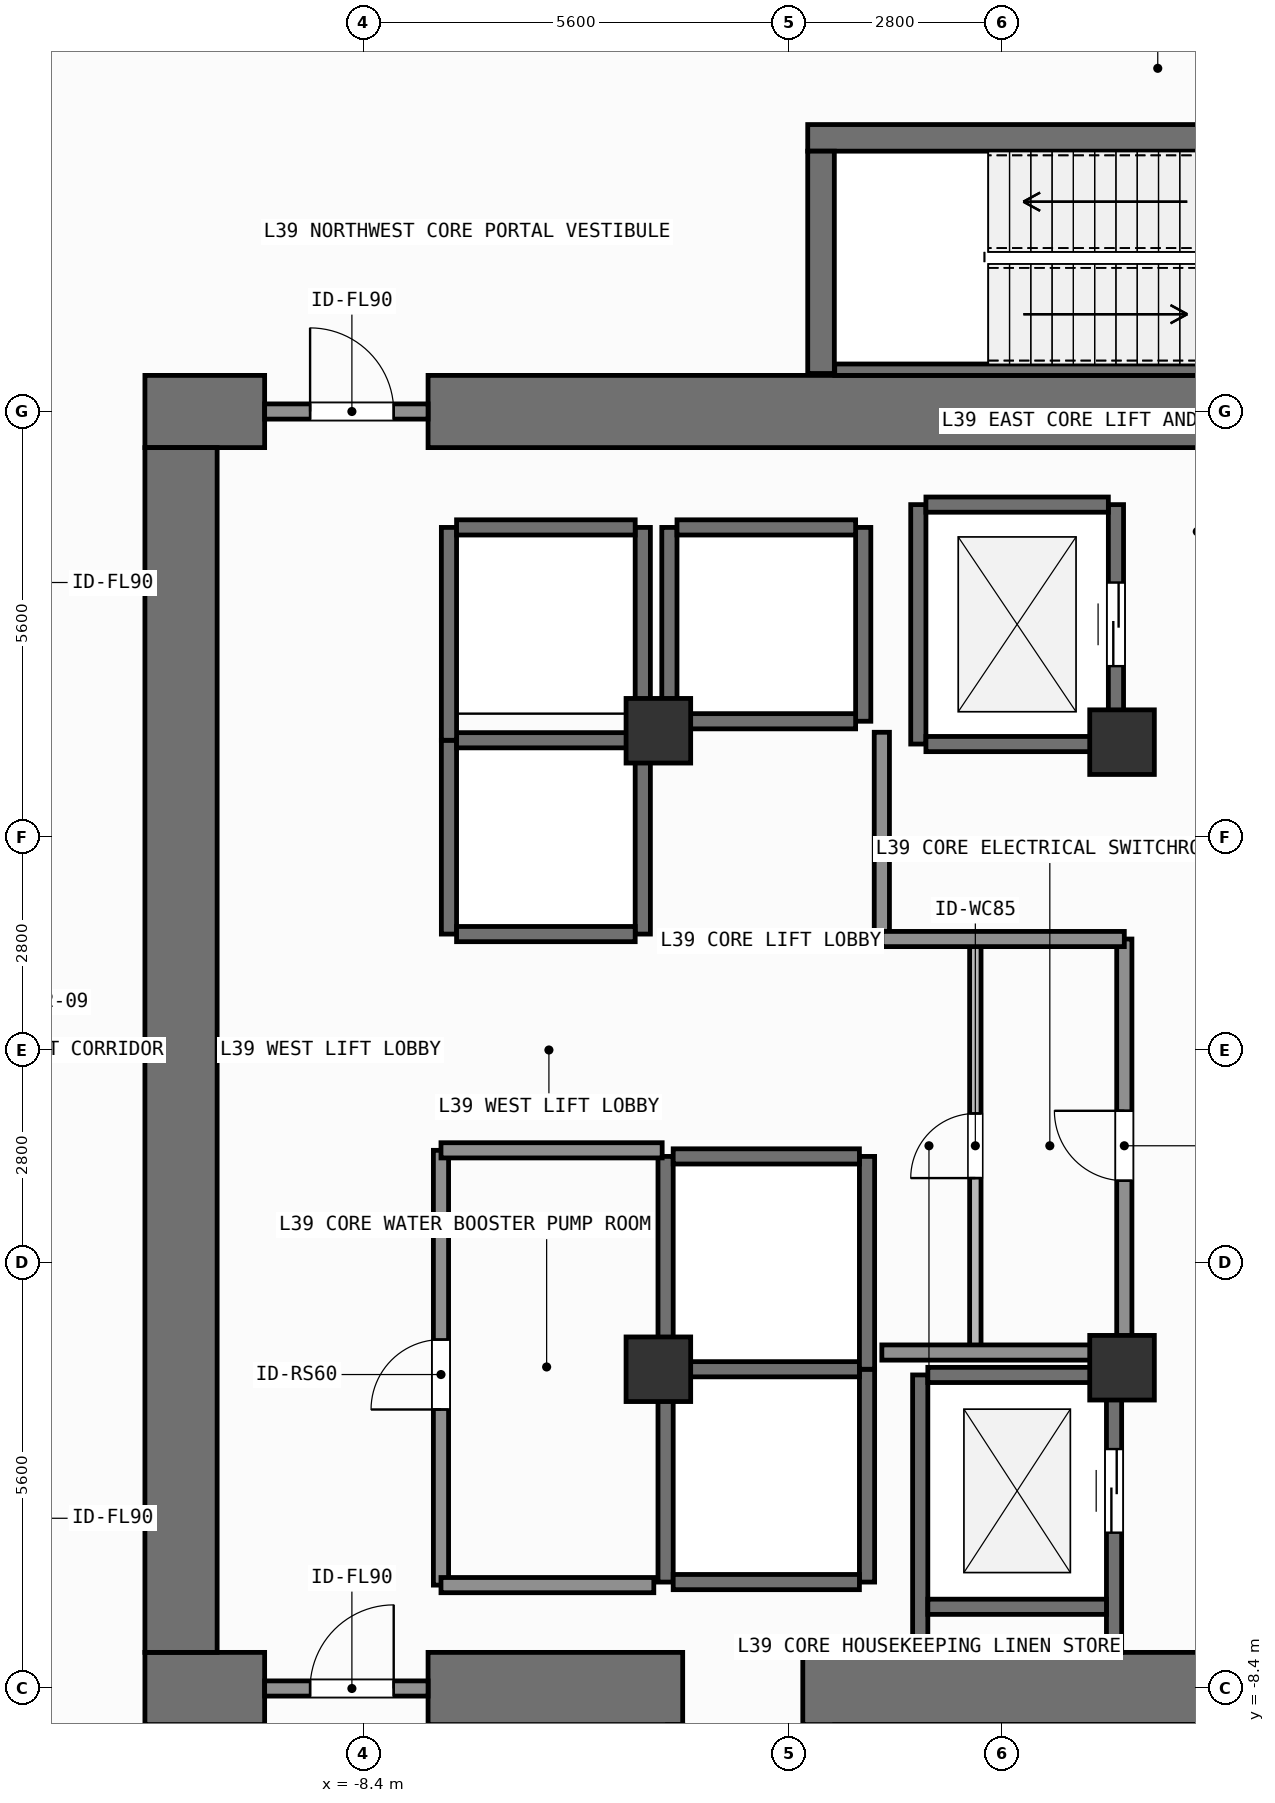
"""IFC4 building model, lengths in metres.
Left out: names, types, materials, properties, quantities, classifications, styles, units other than length and angle.
Written with IfcOpenShell. Run it as: python <this file> out.ifc"""

import sys

from ifc_helpers import new_model, si_unit, direction, frame, frame_2d, origin, origin_2d, place, context, subcontext, project, spatial, rectangle, extrude, element, fill, save


model = new_model("IFC4")
c1 = context("Model", 3, precision=1e-05, world=origin(), true_north=direction((0.0, 1.0)))
c2 = subcontext(c1, "Body", "Model", "MODEL_VIEW")
j1 = project(units=[si_unit("LENGTHUNIT", "METRE"), si_unit("PLANEANGLEUNIT", "RADIAN")], contexts=[c1])
p1 = place(None, origin())
s1 = spatial("IfcSite", under=j1, at=p1, CompositionType="ELEMENT")
p2 = place(p1, origin())
s2 = spatial("IfcBuilding", under=s1, at=p2, CompositionType="ELEMENT")
p3 = place(p2, frame((0.0, 0.0, 156.3)))
s3 = spatial("IfcBuildingStorey", under=s2, at=p3, CompositionType="ELEMENT", Elevation=156.3)
p4 = place(p3, frame((-11.275, -8.4, 0.0), z_axis=(0.0, 0.0, 1.0), x_axis=(1.0, 0.0, 0.0)))
e1 = element("IfcWall", 1, at=p4, inside=s3, PredefinedType="SHEAR", context=c2, shape_type="SweptSolid", body=[
    extrude(rectangle(XDim=1.575, YDim=0.95, at=frame_2d((0.788, 0.0))), origin(), (0.0, 0.0, 1.0), 7.8),
])
p5 = place(p3, frame((-7.55, -8.4, 0.0), z_axis=(0.0, 0.0, 1.0), x_axis=(1.0, 0.0, 0.0)))
e2 = element("IfcWall", 2, at=p5, inside=s3, PredefinedType="SHEAR", context=c2, shape_type="SweptSolid", body=[
    extrude(rectangle(XDim=3.35, YDim=0.95, at=frame_2d((1.675, 0.0))), origin(), (0.0, 0.0, 1.0), 7.8),
])
p6 = place(p3, frame((-2.62, -8.4, 0.0), z_axis=(0.0, 0.0, 1.0), x_axis=(1.0, 0.0, 0.0)))
e3 = element("IfcWall", 3, at=p6, inside=s3, PredefinedType="SHEAR", context=c2, shape_type="SweptSolid", body=[
    extrude(rectangle(XDim=7.27, YDim=0.95, at=frame_2d((3.635, 0.0))), origin(), (0.0, 0.0, 1.0), 7.8),
])
p7 = place(p3, frame((-11.275, 8.4, 0.0), z_axis=(0.0, 0.0, 1.0), x_axis=(1.0, 0.0, 0.0)))
e4 = element("IfcWall", 4, at=p7, inside=s3, PredefinedType="SHEAR", context=c2, shape_type="SweptSolid", body=[
    extrude(rectangle(XDim=1.575, YDim=0.95, at=frame_2d((0.788, 0.0))), origin(), (0.0, 0.0, 1.0), 7.8),
])
p8 = place(p3, frame((-7.55, 8.4, 0.0), z_axis=(0.0, 0.0, 1.0), x_axis=(1.0, 0.0, 0.0)))
e5 = element("IfcWall", 5, at=p8, inside=s3, PredefinedType="SHEAR", context=c2, shape_type="SweptSolid", body=[
    extrude(rectangle(XDim=16.425, YDim=0.95, at=frame_2d((8.212, 0.0))), origin(), (0.0, 0.0, 1.0), 7.8),
])
p9 = place(p3, frame((-10.8, -7.925, 0.0), z_axis=(0.0, 0.0, 1.0), x_axis=(0.0, 1.0, 0.0)))
e6 = element("IfcWall", 6, at=p9, inside=s3, PredefinedType="SHEAR", context=c2, shape_type="SweptSolid", body=[
    extrude(rectangle(XDim=15.85, YDim=0.95, at=frame_2d((7.925, 0.0))), origin(), (0.0, 0.0, 1.0), 7.8),
])
p10 = place(p3, frame((-2.555, 12.0, 0.0), z_axis=(0.0, 0.0, 1.0), x_axis=(1.0, 0.0, 0.0)))
e7 = element("IfcWall", 7, at=p10, inside=s3, PredefinedType="SHEAR", context=c2, shape_type="SweptSolid", body=[
    extrude(rectangle(XDim=7.31, YDim=0.35, at=frame_2d((3.655, 0.0))), origin(), (0.0, 0.0, 1.0), 7.8),
])
p11 = place(p3, frame((-2.2, 8.95, 0.0), z_axis=(0.0, 0.0, 1.0), x_axis=(1.0, 0.0, 0.0)))
e8 = element("IfcWall", 8, at=p11, inside=s3, PredefinedType="SHEAR", context=c2, shape_type="SweptSolid", body=[
    extrude(rectangle(XDim=6.6, YDim=0.15, at=frame_2d((3.3, 0.0))), origin(), (0.0, 0.0, 1.0), 7.8),
])
p12 = place(p3, frame((-2.38, 8.9, 0.0), z_axis=(0.0, 0.0, 1.0), x_axis=(0.0, 1.0, 0.0)))
e9 = element("IfcWall", 9, at=p12, inside=s3, PredefinedType="SHEAR", context=c2, shape_type="SweptSolid", body=[
    extrude(rectangle(XDim=2.925, YDim=0.35, at=frame_2d((1.462, 0.0))), origin(), (0.0, 0.0, 1.0), 7.8),
])
for number, where, z_axis, x_axis in (
    (10, (-4.52, -4.2, 0.0), (0.0, 0.0, 1.0), (1.0, 0.0, 0.0)),
    (11, (1.58, -4.18, 0.0), (0.0, 0.0, 1.0), (1.0, 0.0, 0.0)),
    (12, (1.58, 4.05, 0.0), (0.0, 0.0, 1.0), (1.0, 0.0, 0.0)),
    (13, (-4.52, 4.2, 0.0), (0.0, 0.0, 1.0), (1.0, 0.0, 0.0)),
):
    element("IfcColumn", number, at=place(p3, frame(where, z_axis=z_axis, x_axis=x_axis)), inside=s3, PredefinedType="COLUMN", context=c2, shape_type="SweptSolid", body=[
        extrude(rectangle(XDim=0.85, YDim=0.85, at=origin_2d()), origin(), (0.0, 0.0, 1.0), 7.8),
    ])
for number, where, z_axis, x_axis in (
    (14, (-7.275, 1.525, 0.0), (0.0, 0.0, 1.0), (0.0, 1.0, 0.0)),
    (15, (-4.725, 1.525, 0.0), (0.0, 0.0, 1.0), (0.0, 1.0, 0.0)),
):
    element("IfcWall", number, at=place(p3, frame(where, z_axis=z_axis, x_axis=x_axis)), inside=s3, PredefinedType="SHEAR", context=c2, shape_type="SweptSolid", body=[
        extrude(rectangle(XDim=2.55, YDim=0.2, at=frame_2d((1.275, 0.0))), origin(), (0.0, 0.0, 1.0), 7.58),
    ])
for number, where, z_axis, x_axis in (
    (16, (-7.175, 1.525, 0.0), (0.0, 0.0, 1.0), (1.0, 0.0, 0.0)),
    (17, (-7.175, 4.075, 0.0), (0.0, 0.0, 1.0), (1.0, 0.0, 0.0)),
):
    element("IfcWall", number, at=place(p3, frame(where, z_axis=z_axis, x_axis=x_axis)), inside=s3, PredefinedType="SHEAR", context=c2, shape_type="SweptSolid", body=[
        extrude(rectangle(XDim=2.35, YDim=0.2, at=frame_2d((1.175, 0.0))), origin(), (0.0, 0.0, 1.0), 7.58),
    ])
for number, where, z_axis, x_axis in (
    (18, (-7.275, 4.075, 0.0), (0.0, 0.0, 1.0), (0.0, 1.0, 0.0)),
    (19, (-4.725, 4.075, 0.0), (0.0, 0.0, 1.0), (0.0, 1.0, 0.0)),
):
    element("IfcWall", number, at=place(p3, frame(where, z_axis=z_axis, x_axis=x_axis)), inside=s3, PredefinedType="SHEAR", context=c2, shape_type="SweptSolid", body=[
        extrude(rectangle(XDim=2.8, YDim=0.2, at=frame_2d((1.4, 0.0))), origin(), (0.0, 0.0, 1.0), 7.58),
    ])
p13 = place(p3, frame((-7.175, 6.875, 0.0), z_axis=(0.0, 0.0, 1.0), x_axis=(1.0, 0.0, 0.0)))
e20 = element("IfcWall", 20, at=p13, inside=s3, PredefinedType="SHEAR", context=c2, shape_type="SweptSolid", body=[
    extrude(rectangle(XDim=2.35, YDim=0.2, at=frame_2d((1.175, 0.0))), origin(), (0.0, 0.0, 1.0), 7.58),
])
for number, where, z_axis, x_axis in (
    (21, (-4.375, 4.325, 0.0), (0.0, 0.0, 1.0), (0.0, 1.0, 0.0)),
    (22, (-1.825, 4.325, 0.0), (0.0, 0.0, 1.0), (0.0, 1.0, 0.0)),
):
    element("IfcWall", number, at=place(p3, frame(where, z_axis=z_axis, x_axis=x_axis)), inside=s3, PredefinedType="SHEAR", context=c2, shape_type="SweptSolid", body=[
        extrude(rectangle(XDim=2.55, YDim=0.2, at=frame_2d((1.275, 0.0))), origin(), (0.0, 0.0, 1.0), 7.58),
    ])
for number, where, z_axis, x_axis in (
    (23, (-4.275, 4.325, 0.0), (0.0, 0.0, 1.0), (1.0, 0.0, 0.0)),
    (24, (-4.275, 6.875, 0.0), (0.0, 0.0, 1.0), (1.0, 0.0, 0.0)),
):
    element("IfcWall", number, at=place(p3, frame(where, z_axis=z_axis, x_axis=x_axis)), inside=s3, PredefinedType="SHEAR", context=c2, shape_type="SweptSolid", body=[
        extrude(rectangle(XDim=2.35, YDim=0.2, at=frame_2d((1.175, 0.0))), origin(), (0.0, 0.0, 1.0), 7.58),
    ])
for number, where, z_axis, x_axis in (
    (25, (-4.425, -7.0, 0.0), (0.0, 0.0, 1.0), (0.0, 1.0, 0.0)),
    (26, (-1.775, -7.0, 0.0), (0.0, 0.0, 1.0), (0.0, 1.0, 0.0)),
):
    element("IfcWall", number, at=place(p3, frame(where, z_axis=z_axis, x_axis=x_axis)), inside=s3, PredefinedType="SHEAR", context=c2, shape_type="SweptSolid", body=[
        extrude(rectangle(XDim=2.8, YDim=0.2, at=frame_2d((1.4, 0.0))), origin(), (0.0, 0.0, 1.0), 7.58),
    ])
for number, where, z_axis, x_axis in (
    (27, (-4.325, -7.0, 0.0), (0.0, 0.0, 1.0), (1.0, 0.0, 0.0)),
    (28, (-4.325, -4.2, 0.0), (0.0, 0.0, 1.0), (1.0, 0.0, 0.0)),
):
    element("IfcWall", number, at=place(p3, frame(where, z_axis=z_axis, x_axis=x_axis)), inside=s3, PredefinedType="SHEAR", context=c2, shape_type="SweptSolid", body=[
        extrude(rectangle(XDim=2.45, YDim=0.2, at=frame_2d((1.225, 0.0))), origin(), (0.0, 0.0, 1.0), 7.58),
    ])
for number, where, z_axis, x_axis in (
    (29, (-4.425, -4.2, 0.0), (0.0, 0.0, 1.0), (0.0, 1.0, 0.0)),
    (30, (-1.775, -4.2, 0.0), (0.0, 0.0, 1.0), (0.0, 1.0, 0.0)),
):
    element("IfcWall", number, at=place(p3, frame(where, z_axis=z_axis, x_axis=x_axis)), inside=s3, PredefinedType="SHEAR", context=c2, shape_type="SweptSolid", body=[
        extrude(rectangle(XDim=2.8, YDim=0.2, at=frame_2d((1.4, 0.0))), origin(), (0.0, 0.0, 1.0), 7.58),
    ])
p14 = place(p3, frame((-4.325, -1.4, 0.0), z_axis=(0.0, 0.0, 1.0), x_axis=(1.0, 0.0, 0.0)))
e31 = element("IfcWall", 31, at=p14, inside=s3, PredefinedType="SHEAR", context=c2, shape_type="SweptSolid", body=[
    extrude(rectangle(XDim=2.45, YDim=0.2, at=frame_2d((1.225, 0.0))), origin(), (0.0, 0.0, 1.0), 7.58),
])
p15 = place(p3, frame((-1.1, 4.025, 0.0), z_axis=(0.0, 0.0, 1.0), x_axis=(0.0, 1.0, 0.0)))
e32 = element("IfcWall", 32, at=p15, inside=s3, PredefinedType="SHEAR", context=c2, shape_type="SweptSolid", body=[
    extrude(rectangle(XDim=3.15, YDim=0.2, at=frame_2d((1.575, 0.0))), origin(), (0.0, 0.0, 1.0), 7.58),
])
p16 = place(p3, frame((1.5, 4.025, 0.0), z_axis=(0.0, 0.0, 1.0), x_axis=(0.0, 1.0, 0.0)))
e33 = element("IfcWall", 33, at=p16, inside=s3, PredefinedType="SHEAR", context=c2, shape_type="SweptSolid", body=[
    extrude(rectangle(XDim=3.15, YDim=0.2, at=frame_2d((1.575, 0.0))), origin(), (0.0, 0.0, 1.0), 7.58),
])
p17 = place(p16, frame((1.025, 0.0, 0.0)))
e34 = element("IfcOpeningElement", 34, at=p17, cuts=e33, PredefinedType="OPENING", context=c2, shape_type="SweptSolid", body=[
    extrude(rectangle(XDim=1.1, YDim=2.2, at=frame_2d((0.55, 1.1))), frame((0.0, 0.11, 0.0), z_axis=(0.0, -1.0, 0.0), x_axis=(1.0, 0.0, 0.0)), (0.0, 0.0, 1.0), 0.22),
])
for number, where, z_axis, x_axis in (
    (35, (-1.0, 4.025, 0.0), (0.0, 0.0, 1.0), (1.0, 0.0, 0.0)),
    (36, (-1.0, 7.175, 0.0), (0.0, 0.0, 1.0), (1.0, 0.0, 0.0)),
):
    element("IfcWall", number, at=place(p3, frame(where, z_axis=z_axis, x_axis=x_axis)), inside=s3, PredefinedType="SHEAR", context=c2, shape_type="SweptSolid", body=[
        extrude(rectangle(XDim=2.4, YDim=0.2, at=frame_2d((1.2, 0.0))), origin(), (0.0, 0.0, 1.0), 7.58),
    ])
p18 = place(p3, frame((-1.075, -7.925, 0.0), z_axis=(0.0, 0.0, 1.0), x_axis=(0.0, 1.0, 0.0)))
e37 = element("IfcWall", 37, at=p18, inside=s3, PredefinedType="SHEAR", context=c2, shape_type="SweptSolid", body=[
    extrude(rectangle(XDim=3.65, YDim=0.2, at=frame_2d((1.825, 0.0))), origin(), (0.0, 0.0, 1.0), 7.58),
])
p19 = place(p3, frame((1.475, -7.925, 0.0), z_axis=(0.0, 0.0, 1.0), x_axis=(0.0, 1.0, 0.0)))
e38 = element("IfcWall", 38, at=p19, inside=s3, PredefinedType="SHEAR", context=c2, shape_type="SweptSolid", body=[
    extrude(rectangle(XDim=3.65, YDim=0.2, at=frame_2d((1.825, 0.0))), origin(), (0.0, 0.0, 1.0), 7.58),
])
p20 = place(p19, frame((1.575, 0.0, 0.0)))
e39 = element("IfcOpeningElement", 39, at=p20, cuts=e38, PredefinedType="OPENING", context=c2, shape_type="SweptSolid", body=[
    extrude(rectangle(XDim=1.1, YDim=2.2, at=frame_2d((0.55, 1.1))), frame((0.0, 0.11, 0.0), z_axis=(0.0, -1.0, 0.0), x_axis=(1.0, 0.0, 0.0)), (0.0, 0.0, 1.0), 0.22),
])
for number, where, z_axis, x_axis in (
    (40, (-0.975, -7.325, 0.0), (0.0, 0.0, 1.0), (1.0, 0.0, 0.0)),
    (41, (-0.975, -4.275, 0.0), (0.0, 0.0, 1.0), (1.0, 0.0, 0.0)),
):
    element("IfcWall", number, at=place(p3, frame(where, z_axis=z_axis, x_axis=x_axis)), inside=s3, PredefinedType="SHEAR", context=c2, shape_type="SweptSolid", body=[
        extrude(rectangle(XDim=2.35, YDim=0.2, at=frame_2d((1.175, 0.0))), origin(), (0.0, 0.0, 1.0), 7.58),
    ])
p21 = place(p3, frame((-9.7, -8.4, 0.0), z_axis=(0.0, 0.0, 1.0), x_axis=(1.0, 0.0, 0.0)))
e42 = element("IfcWall", 42, at=p21, inside=s3, PredefinedType="SOLIDWALL", context=c2, shape_type="SweptSolid", body=[
    extrude(rectangle(XDim=2.15, YDim=0.2, at=frame_2d((1.075, 0.0))), origin(), (0.0, 0.0, 1.0), 6.62),
])
p22 = place(p21, frame((0.598, 0.0, 0.0)))
e43 = element("IfcOpeningElement", 43, at=p22, cuts=e42, PredefinedType="OPENING", context=c2, shape_type="SweptSolid", body=[
    extrude(rectangle(XDim=1.1, YDim=2.15, at=frame_2d((0.55, 1.075))), frame((0.0, 0.11, 0.0), z_axis=(0.0, -1.0, 0.0), x_axis=(1.0, 0.0, 0.0)), (0.0, 0.0, 1.0), 0.22),
])
p23 = place(p3, frame((-9.7, 8.4, 0.0), z_axis=(0.0, 0.0, 1.0), x_axis=(1.0, 0.0, 0.0)))
e44 = element("IfcWall", 44, at=p23, inside=s3, PredefinedType="SOLIDWALL", context=c2, shape_type="SweptSolid", body=[
    extrude(rectangle(XDim=2.15, YDim=0.2, at=frame_2d((1.075, 0.0))), origin(), (0.0, 0.0, 1.0), 6.62),
])
p24 = place(p23, frame((0.598, 0.0, 0.0)))
e45 = element("IfcOpeningElement", 45, at=p24, cuts=e44, PredefinedType="OPENING", context=c2, shape_type="SweptSolid", body=[
    extrude(rectangle(XDim=1.1, YDim=2.15, at=frame_2d((0.55, 1.075))), frame((0.0, 0.11, 0.0), z_axis=(0.0, -1.0, 0.0), x_axis=(1.0, 0.0, 0.0)), (0.0, 0.0, 1.0), 0.22),
])
p25 = place(p3, frame((-0.35, -3.98, 0.0), z_axis=(0.0, 0.0, 1.0), x_axis=(0.0, 1.0, 0.0)))
e46 = element("IfcWall", 46, at=p25, inside=s3, PredefinedType="PARTITIONING", context=c2, shape_type="SweptSolid", body=[
    extrude(rectangle(XDim=5.44, YDim=0.15, at=frame_2d((2.72, 0.0))), origin(), (0.0, 0.0, 1.0), 7.58),
])
p26 = place(p25, frame((2.295, 0.0, 0.0)))
e47 = element("IfcOpeningElement", 47, at=p26, cuts=e46, PredefinedType="OPENING", context=c2, shape_type="SweptSolid", body=[
    extrude(rectangle(XDim=0.85, YDim=2.1, at=frame_2d((0.425, 1.05))), frame((0.0, 0.085, 0.0), z_axis=(0.0, -1.0, 0.0), x_axis=(1.0, 0.0, 0.0)), (0.0, 0.0, 1.0), 0.17),
])
p27 = place(p3, frame((1.61, -3.98, 0.0), z_axis=(0.0, 0.0, 1.0), x_axis=(0.0, 1.0, 0.0)))
e48 = element("IfcWall", 48, at=p27, inside=s3, PredefinedType="SOLIDWALL", context=c2, shape_type="SweptSolid", body=[
    extrude(rectangle(XDim=5.44, YDim=0.2, at=frame_2d((2.72, 0.0))), origin(), (0.0, 0.0, 1.0), 7.58),
])
p28 = place(p27, frame((2.26, 0.0, 0.0)))
e49 = element("IfcOpeningElement", 49, at=p28, cuts=e48, PredefinedType="OPENING", context=c2, shape_type="SweptSolid", body=[
    extrude(rectangle(XDim=0.92, YDim=2.1, at=frame_2d((0.46, 1.05))), frame((0.0, 0.11, 0.0), z_axis=(0.0, -1.0, 0.0), x_axis=(1.0, 0.0, 0.0)), (0.0, 0.0, 1.0), 0.22),
])
p29 = place(p3, frame((-7.38, -7.04, 0.0), z_axis=(0.0, 0.0, 1.0), x_axis=(0.0, 1.0, 0.0)))
e50 = element("IfcWall", 50, at=p29, inside=s3, PredefinedType="SOLIDWALL", context=c2, shape_type="SweptSolid", body=[
    extrude(rectangle(XDim=5.72, YDim=0.2, at=frame_2d((2.86, 0.0))), origin(), (0.0, 0.0, 1.0), 7.58),
])
p30 = place(p29, frame((2.31, 0.0, 0.0)))
e51 = element("IfcOpeningElement", 51, at=p30, cuts=e50, PredefinedType="OPENING", context=c2, shape_type="SweptSolid", body=[
    extrude(rectangle(XDim=0.92, YDim=2.1, at=frame_2d((0.46, 1.05))), frame((0.0, 0.11, 0.0), z_axis=(0.0, -1.0, 0.0), x_axis=(1.0, 0.0, 0.0)), (0.0, 0.0, 1.0), 0.22),
])
p31 = place(p3, frame((-7.38, -1.32, 0.0), z_axis=(0.0, 0.0, 1.0), x_axis=(1.0, 0.0, 0.0)))
e52 = element("IfcWall", 52, at=p31, inside=s3, PredefinedType="SOLIDWALL", context=c2, shape_type="SweptSolid", body=[
    extrude(rectangle(XDim=2.91, YDim=0.2, at=frame_2d((1.455, 0.0))), origin(), (0.0, 0.0, 1.0), 7.58),
])
p32 = place(p3, frame((-1.58, 1.48, 0.0), z_axis=(0.0, 0.0, 1.0), x_axis=(0.0, 1.0, 0.0)))
e53 = element("IfcWall", 53, at=p32, inside=s3, PredefinedType="SOLIDWALL", context=c2, shape_type="SweptSolid", body=[
    extrude(rectangle(XDim=2.7, YDim=0.2, at=frame_2d((1.35, 0.0))), origin(), (0.0, 0.0, 1.0), 7.58),
])
for number, where, z_axis, x_axis in (
    (54, (-1.58, -3.98, 0.0), (0.0, 0.0, 1.0), (1.0, 0.0, 0.0)),
    (55, (-1.58, 1.46, 0.0), (0.0, 0.0, 1.0), (1.0, 0.0, 0.0)),
):
    element("IfcWall", number, at=place(p3, frame(where, z_axis=z_axis, x_axis=x_axis)), inside=s3, PredefinedType="SOLIDWALL", context=c2, shape_type="SweptSolid", body=[
        extrude(rectangle(XDim=3.19, YDim=0.2, at=frame_2d((1.595, 0.0))), origin(), (0.0, 0.0, 1.0), 7.58),
    ])
p33 = place(p3, frame((-7.38, -7.04, 0.0), z_axis=(0.0, 0.0, 1.0), x_axis=(1.0, 0.0, 0.0)))
e56 = element("IfcWall", 56, at=p33, inside=s3, PredefinedType="SOLIDWALL", context=c2, shape_type="SweptSolid", body=[
    extrude(rectangle(XDim=2.8, YDim=0.2, at=frame_2d((1.4, 0.0))), origin(), (0.0, 0.0, 1.0), 7.58),
])
p34 = place(p17, origin())
e57 = element("IfcDoor", 57, at=p34, inside=s3, OperationType="SLIDING_TO_LEFT", PredefinedType="DOOR", context=c2, shape_type="SweptSolid", body=[
    extrude(rectangle(XDim=1.1, YDim=2.2, at=frame_2d((0.55, 1.1))), frame((0.0, 0.025, 0.0), z_axis=(0.0, -1.0, 0.0), x_axis=(1.0, 0.0, 0.0)), (0.0, 0.0, 1.0), 0.05),
])
fill(e34, e57)
p35 = place(p20, origin())
e58 = element("IfcDoor", 58, at=p35, inside=s3, OperationType="SLIDING_TO_LEFT", PredefinedType="DOOR", context=c2, shape_type="SweptSolid", body=[
    extrude(rectangle(XDim=1.1, YDim=2.2, at=frame_2d((0.55, 1.1))), frame((0.0, 0.025, 0.0), z_axis=(0.0, -1.0, 0.0), x_axis=(1.0, 0.0, 0.0)), (0.0, 0.0, 1.0), 0.05),
])
fill(e39, e58)
p36 = place(p22, origin())
e59 = element("IfcDoor", 59, at=p36, inside=s3, OperationType="SINGLE_SWING_RIGHT", PredefinedType="DOOR", context=c2, shape_type="SweptSolid", body=[
    extrude(rectangle(XDim=1.1, YDim=2.15, at=frame_2d((0.55, 1.075))), frame((0.0, 0.025, 0.0), z_axis=(0.0, -1.0, 0.0), x_axis=(1.0, 0.0, 0.0)), (0.0, 0.0, 1.0), 0.05),
])
fill(e43, e59)
p37 = place(p24, origin())
e60 = element("IfcDoor", 60, at=p37, inside=s3, OperationType="SINGLE_SWING_LEFT", PredefinedType="DOOR", context=c2, shape_type="SweptSolid", body=[
    extrude(rectangle(XDim=1.1, YDim=2.15, at=frame_2d((0.55, 1.075))), frame((0.0, 0.025, 0.0), z_axis=(0.0, -1.0, 0.0), x_axis=(1.0, 0.0, 0.0)), (0.0, 0.0, 1.0), 0.05),
])
fill(e45, e60)
p38 = place(p26, origin())
e61 = element("IfcDoor", 61, at=p38, inside=s3, OperationType="SINGLE_SWING_LEFT", PredefinedType="DOOR", context=c2, shape_type="SweptSolid", body=[
    extrude(rectangle(XDim=0.85, YDim=2.1, at=frame_2d((0.425, 1.05))), frame((0.0, 0.025, 0.0), z_axis=(0.0, -1.0, 0.0), x_axis=(1.0, 0.0, 0.0)), (0.0, 0.0, 1.0), 0.05),
])
fill(e47, e61)
p39 = place(p28, origin())
e62 = element("IfcDoor", 62, at=p39, inside=s3, OperationType="SINGLE_SWING_RIGHT", PredefinedType="DOOR", context=c2, shape_type="SweptSolid", body=[
    extrude(rectangle(XDim=0.92, YDim=2.1, at=frame_2d((0.46, 1.05))), frame((0.0, 0.025, 0.0), z_axis=(0.0, -1.0, 0.0), x_axis=(1.0, 0.0, 0.0)), (0.0, 0.0, 1.0), 0.05),
])
fill(e49, e62)
p40 = place(p30, origin())
e63 = element("IfcDoor", 63, at=p40, inside=s3, OperationType="SINGLE_SWING_LEFT", PredefinedType="DOOR", context=c2, shape_type="SweptSolid", body=[
    extrude(rectangle(XDim=0.92, YDim=2.1, at=frame_2d((0.46, 1.05))), frame((0.0, 0.025, 0.0), z_axis=(0.0, -1.0, 0.0), x_axis=(1.0, 0.0, 0.0)), (0.0, 0.0, 1.0), 0.05),
])
fill(e51, e63)
save(model, sys.argv[1])
